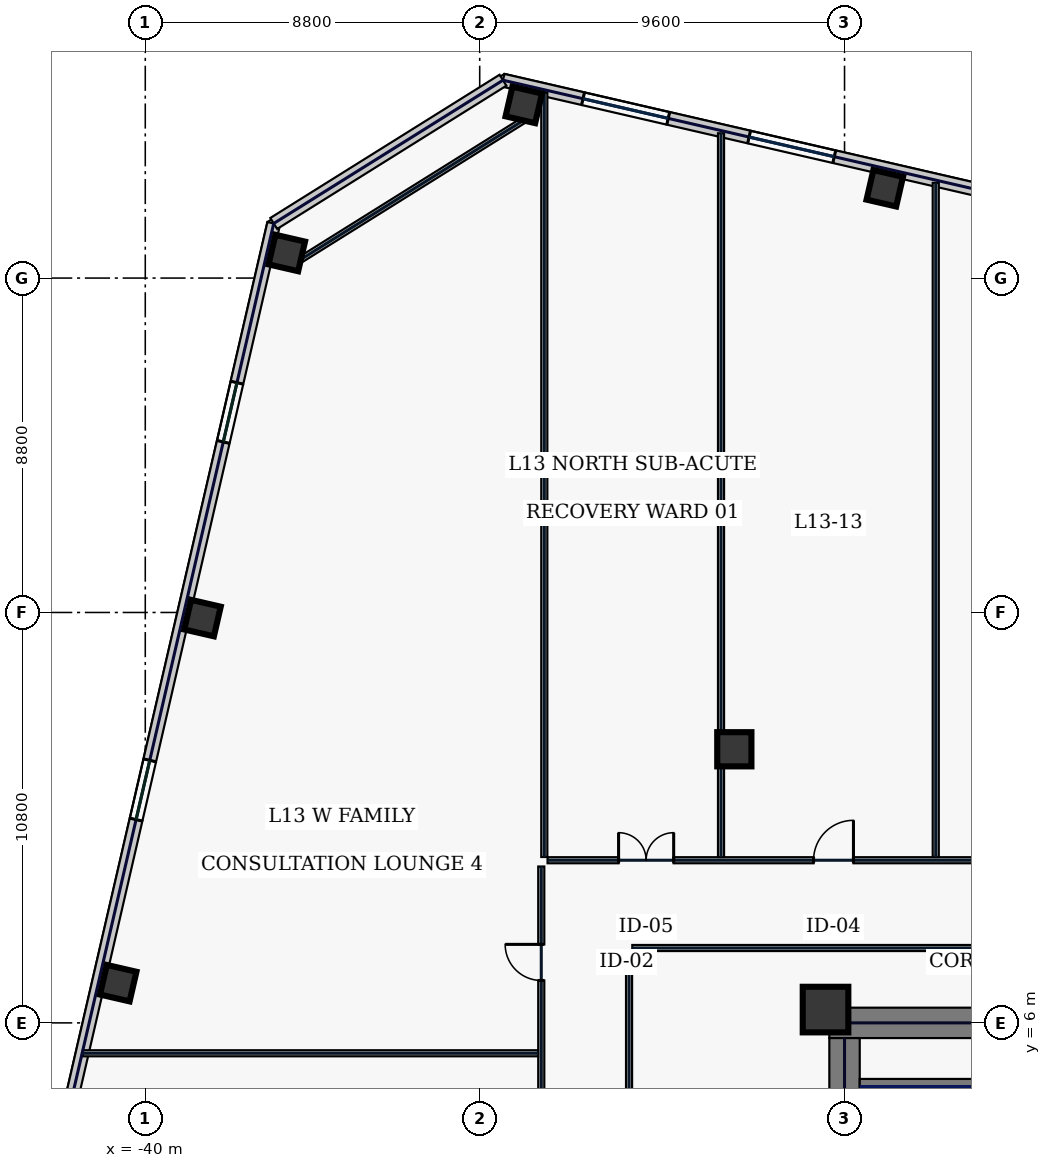
"""IFC4 building model, lengths in metres.
Left out: names, types, materials, properties, quantities, classifications, styles, units other than length and angle.
Written with IfcOpenShell. Run it as: python <this file> out.ifc"""

import sys

from ifc_helpers import new_model, si_unit, direction, frame, frame_2d, origin, origin_2d, place, context, subcontext, project, spatial, rectangle, hollow_rectangle, extrude, element, fill, save


model = new_model("IFC4")
c1 = context("Model", 3, precision=1e-05, world=origin(), true_north=direction((0.0, 1.0)))
c2 = subcontext(c1, "Body", "Model", "MODEL_VIEW")
j1 = project(units=[si_unit("LENGTHUNIT", "METRE"), si_unit("PLANEANGLEUNIT", "RADIAN")], contexts=[c1])
p1 = place(None, origin())
s1 = spatial("IfcSite", under=j1, at=p1, CompositionType="ELEMENT")
p2 = place(p1, origin())
s2 = spatial("IfcBuilding", under=s1, at=p2, CompositionType="ELEMENT")
p3 = place(p2, frame((0.0, 0.0, 63.4)))
s3 = spatial("IfcBuildingStorey", under=s2, at=p3, CompositionType="ELEMENT", Elevation=63.4)
p4 = place(p3, frame((-22.0, 6.0, 0.0), z_axis=(0.0, 0.0, 1.0), x_axis=(1.0, 0.0, 0.0)))
e1 = element("IfcWall", 1, at=p4, inside=s3, PredefinedType="SHEAR", context=c2, shape_type="SweptSolid", body=[
    extrude(rectangle(XDim=11.6, YDim=0.8, at=frame_2d((5.8, 0.0))), origin(), (0.0, 0.0, 1.0), 3.74),
])
p5 = place(p3, frame((-21.6, -5.6, 0.0), z_axis=(0.0, 0.0, 1.0), x_axis=(0.0, 1.0, 0.0)))
e2 = element("IfcWall", 2, at=p5, inside=s3, PredefinedType="SHEAR", context=c2, shape_type="SweptSolid", body=[
    extrude(rectangle(XDim=11.2, YDim=0.8, at=frame_2d((5.6, 0.0))), origin(), (0.0, 0.0, 1.0), 3.74),
])
p6 = place(p3, frame((-21.2, 4.325, 0.0), z_axis=(0.0, 0.0, 1.0), x_axis=(1.0, 0.0, 0.0)))
e3 = element("IfcWall", 3, at=p6, inside=s3, PredefinedType="SHEAR", context=c2, shape_type="SweptSolid", body=[
    extrude(rectangle(XDim=3.4, YDim=0.4, at=frame_2d((1.7, 0.0))), origin(), (0.0, 0.0, 1.0), 3.74),
])
p7 = place(p3, frame((-22.1, 6.35, 0.0), z_axis=(0.0, 0.0, 1.0), x_axis=(1.0, 0.0, 0.0)))
e4 = element("IfcColumn", 4, at=p7, inside=s3, PredefinedType="COLUMN", context=c2, shape_type="SweptSolid", body=[
    extrude(hollow_rectangle(XDim=1.2, YDim=1.2, WallThickness=0.05, at=origin_2d()), origin(), (0.0, 0.0, 1.0), 3.74),
])
p8 = place(p3, frame((-24.5, 13.2, 0.0), z_axis=(0.0, 0.0, 1.0), x_axis=(1.0, 0.0, 0.0)))
e5 = element("IfcColumn", 5, at=p8, inside=s3, PredefinedType="COLUMN", context=c2, shape_type="SweptSolid", body=[
    extrude(hollow_rectangle(XDim=0.9, YDim=0.9, WallThickness=0.04, at=origin_2d()), origin(), (0.0, 0.0, 1.0), 3.74),
])
for number, where, z_axis, x_axis in (
    (6, (-20.541, 27.964, 0.0), (0.0, 0.0, 1.0), (0.974, -0.225, 0.0)),
    (7, (-30.04, 30.156, 0.0), (0.0, 0.0, 1.0), (0.974, -0.225, 0.0)),
    (8, (-36.276, 26.26, 0.0), (0.0, 0.0, 1.0), (0.974, -0.225, 0.0)),
    (9, (-38.494, 16.652, 0.0), (0.0, 0.0, 1.0), (0.974, -0.225, 0.0)),
    (10, (-40.712, 7.045, 0.0), (0.0, 0.0, 1.0), (0.974, -0.225, 0.0)),
):
    element("IfcColumn", number, at=place(p3, frame(where, z_axis=z_axis, x_axis=x_axis)), inside=s3, PredefinedType="COLUMN", context=c2, shape_type="SweptSolid", body=[
        extrude(hollow_rectangle(XDim=0.8, YDim=0.8, WallThickness=0.036, at=origin_2d()), origin(), (0.0, 0.0, 1.0), 3.74),
    ])
p9 = place(p3, frame((-8.517, 25.711, 0.0), z_axis=(0.0, 0.0, 1.0), x_axis=(-0.974372845456, 0.224939009598, 0.0)))
e11 = element("IfcWall", 11, at=p9, inside=s3, PredefinedType="STANDARD", context=c2, shape_type="SweptSolid", body=[
    extrude(rectangle(XDim=22.652, YDim=0.34, at=frame_2d((11.326, 0.0))), origin(), (0.0, 0.0, 1.0), 3.74),
])
p10 = place(p9, frame((18.189, 0.0, 0.77)))
e12 = element("IfcOpeningElement", 12, at=p10, cuts=e11, PredefinedType="OPENING", context=c2, shape_type="SweptSolid", body=[
    extrude(rectangle(XDim=2.3, YDim=2.1, at=frame_2d((1.15, 1.05))), frame((0.0, 0.18, 0.0), z_axis=(0.0, -1.0, 0.0), x_axis=(1.0, 0.0, 0.0)), (0.0, 0.0, 1.0), 0.36),
])
p11 = place(p9, frame((13.705, 0.0, 0.77)))
e13 = element("IfcOpeningElement", 13, at=p11, cuts=e11, PredefinedType="OPENING", context=c2, shape_type="SweptSolid", body=[
    extrude(rectangle(XDim=2.3, YDim=2.1, at=frame_2d((1.15, 1.05))), frame((0.0, 0.18, 0.0), z_axis=(0.0, -1.0, 0.0), x_axis=(1.0, 0.0, 0.0)), (0.0, 0.0, 1.0), 0.36),
])
p12 = place(p9, frame((8.441, 0.0, 0.77)))
e14 = element("IfcOpeningElement", 14, at=p12, cuts=e11, PredefinedType="OPENING", context=c2, shape_type="SweptSolid", body=[
    extrude(rectangle(XDim=0.85, YDim=1.85, at=frame_2d((0.425, 0.925))), frame((0.0, 0.18, 0.0), z_axis=(0.0, -1.0, 0.0), x_axis=(1.0, 0.0, 0.0)), (0.0, 0.0, 1.0), 0.36),
])
p13 = place(p9, frame((3.956, 0.0, 0.77)))
e15 = element("IfcOpeningElement", 15, at=p13, cuts=e11, PredefinedType="OPENING", context=c2, shape_type="SweptSolid", body=[
    extrude(rectangle(XDim=2.3, YDim=2.1, at=frame_2d((1.15, 1.05))), frame((0.0, 0.18, 0.0), z_axis=(0.0, -1.0, 0.0), x_axis=(1.0, 0.0, 0.0)), (0.0, 0.0, 1.0), 0.36),
])
p14 = place(p3, frame((-36.62, 27.037, 0.0), z_axis=(0.0, 0.0, 1.0), x_axis=(-0.224951280646, -0.974370012539, 0.0)))
e16 = element("IfcWall", 16, at=p14, inside=s3, PredefinedType="STANDARD", context=c2, shape_type="SweptSolid", body=[
    extrude(rectangle(XDim=40.8, YDim=0.34, at=frame_2d((20.4, 0.0))), origin(), (0.0, 0.0, 1.0), 3.74),
])
p15 = place(p14, frame((4.3, 0.0, 0.58)))
e17 = element("IfcOpeningElement", 17, at=p15, cuts=e16, PredefinedType="OPENING", context=c2, shape_type="SweptSolid", body=[
    extrude(rectangle(XDim=1.6, YDim=2.3, at=frame_2d((0.8, 1.15))), frame((0.0, 0.18, 0.0), z_axis=(0.0, -1.0, 0.0), x_axis=(1.0, 0.0, 0.0)), (0.0, 0.0, 1.0), 0.36),
])
p16 = place(p14, frame((14.5, 0.0, 0.58)))
e18 = element("IfcOpeningElement", 18, at=p16, cuts=e16, PredefinedType="OPENING", context=c2, shape_type="SweptSolid", body=[
    extrude(rectangle(XDim=1.6, YDim=2.3, at=frame_2d((0.8, 1.15))), frame((0.0, 0.18, 0.0), z_axis=(0.0, -1.0, 0.0), x_axis=(1.0, 0.0, 0.0)), (0.0, 0.0, 1.0), 0.36),
])
p17 = place(p14, frame((24.7, 0.0, 0.58)))
e19 = element("IfcOpeningElement", 19, at=p17, cuts=e16, PredefinedType="OPENING", context=c2, shape_type="SweptSolid", body=[
    extrude(rectangle(XDim=1.6, YDim=2.3, at=frame_2d((0.8, 1.15))), frame((0.0, 0.18, 0.0), z_axis=(0.0, -1.0, 0.0), x_axis=(1.0, 0.0, 0.0)), (0.0, 0.0, 1.0), 0.36),
])
p18 = place(p14, frame((34.9, 0.0, 0.58)))
e20 = element("IfcOpeningElement", 20, at=p18, cuts=e16, PredefinedType="OPENING", context=c2, shape_type="SweptSolid", body=[
    extrude(rectangle(XDim=1.6, YDim=2.3, at=frame_2d((0.8, 1.15))), frame((0.0, 0.18, 0.0), z_axis=(0.0, -1.0, 0.0), x_axis=(1.0, 0.0, 0.0)), (0.0, 0.0, 1.0), 0.36),
])
p19 = place(p3, frame((-30.588, 30.807, 0.0), z_axis=(0.0, 0.0, 1.0), x_axis=(-0.848031080615, -0.529946493819, 0.0)))
e21 = element("IfcWall", 21, at=p19, inside=s3, PredefinedType="STANDARD", context=c2, shape_type="SweptSolid", body=[
    extrude(rectangle(XDim=7.114, YDim=0.34, at=frame_2d((3.557, 0.0))), origin(), (0.0, 0.0, 1.0), 3.74),
])
p20 = place(p3, frame((-29.86, 29.868, 0.0), z_axis=(0.0, 0.0, 1.0), x_axis=(-0.848043064089, -0.529927317139, 0.0)))
e22 = element("IfcWall", 22, at=p20, inside=s3, PredefinedType="PARTITIONING", context=c2, shape_type="SweptSolid", body=[
    extrude(rectangle(XDim=7.354, YDim=0.16, at=frame_2d((3.677, 0.0))), origin(), (0.0, 0.0, 1.0), 3.74),
])
p21 = place(p3, frame((-29.58, -10.015, 0.0), z_axis=(0.0, 0.0, 1.0), x_axis=(0.0, 1.0, 0.0)))
e23 = element("IfcWall", 23, at=p21, inside=s3, PredefinedType="PARTITIONING", context=c2, shape_type="SweptSolid", body=[
    extrude(rectangle(XDim=20.13, YDim=0.16, at=frame_2d((10.065, 0.0))), origin(), (0.0, 0.0, 1.0), 3.74),
])
p22 = place(p21, frame((2.169, 0.0, 0.0)))
e24 = element("IfcOpeningElement", 24, at=p22, cuts=e23, PredefinedType="OPENING", context=c2, shape_type="SweptSolid", body=[
    extrude(rectangle(XDim=0.95, YDim=2.2, at=frame_2d((0.475, 1.1))), frame((0.0, 0.09, 0.0), z_axis=(0.0, -1.0, 0.0), x_axis=(1.0, 0.0, 0.0)), (0.0, 0.0, 1.0), 0.18),
])
p23 = place(p21, frame((7.025, 0.0, 0.0)))
e25 = element("IfcOpeningElement", 25, at=p23, cuts=e23, PredefinedType="OPENING", context=c2, shape_type="SweptSolid", body=[
    extrude(rectangle(XDim=0.95, YDim=2.2, at=frame_2d((0.475, 1.1))), frame((0.0, 0.09, 0.0), z_axis=(0.0, -1.0, 0.0), x_axis=(1.0, 0.0, 0.0)), (0.0, 0.0, 1.0), 0.18),
])
p24 = place(p21, frame((12.225, 0.0, 0.0)))
e26 = element("IfcOpeningElement", 26, at=p24, cuts=e23, PredefinedType="OPENING", context=c2, shape_type="SweptSolid", body=[
    extrude(rectangle(XDim=0.95, YDim=2.2, at=frame_2d((0.475, 1.1))), frame((0.0, 0.09, 0.0), z_axis=(0.0, -1.0, 0.0), x_axis=(1.0, 0.0, 0.0)), (0.0, 0.0, 1.0), 0.18),
])
p25 = place(p21, frame((17.131, 0.0, 0.0)))
e27 = element("IfcOpeningElement", 27, at=p25, cuts=e23, PredefinedType="OPENING", context=c2, shape_type="SweptSolid", body=[
    extrude(rectangle(XDim=0.95, YDim=2.2, at=frame_2d((0.475, 1.1))), frame((0.0, 0.09, 0.0), z_axis=(0.0, -1.0, 0.0), x_axis=(1.0, 0.0, 0.0)), (0.0, 0.0, 1.0), 0.18),
])
p26 = place(p3, frame((-29.415, 10.28, 0.0), z_axis=(0.0, 0.0, 1.0), x_axis=(1.0, 0.0, 0.0)))
e28 = element("IfcWall", 28, at=p26, inside=s3, PredefinedType="PARTITIONING", context=c2, shape_type="SweptSolid", body=[
    extrude(rectangle(XDim=58.83, YDim=0.16, at=frame_2d((29.415, 0.0))), origin(), (0.0, 0.0, 1.0), 3.74),
])
p27 = place(p26, frame((1.869, 0.0, 0.0)))
e29 = element("IfcOpeningElement", 29, at=p27, cuts=e28, PredefinedType="OPENING", context=c2, shape_type="SweptSolid", body=[
    extrude(rectangle(XDim=1.45, YDim=2.2, at=frame_2d((0.725, 1.1))), frame((0.0, 0.09, 0.0), z_axis=(0.0, -1.0, 0.0), x_axis=(1.0, 0.0, 0.0)), (0.0, 0.0, 1.0), 0.18),
])
p28 = place(p26, frame((7.0, 0.0, 0.0)))
e30 = element("IfcOpeningElement", 30, at=p28, cuts=e28, PredefinedType="OPENING", context=c2, shape_type="SweptSolid", body=[
    extrude(rectangle(XDim=1.05, YDim=2.2, at=frame_2d((0.525, 1.1))), frame((0.0, 0.09, 0.0), z_axis=(0.0, -1.0, 0.0), x_axis=(1.0, 0.0, 0.0)), (0.0, 0.0, 1.0), 0.18),
])
p29 = place(p26, frame((13.95, 0.0, 0.0)))
e31 = element("IfcOpeningElement", 31, at=p29, cuts=e28, PredefinedType="OPENING", context=c2, shape_type="SweptSolid", body=[
    extrude(rectangle(XDim=1.3, YDim=2.2, at=frame_2d((0.65, 1.1))), frame((0.0, 0.09, 0.0), z_axis=(0.0, -1.0, 0.0), x_axis=(1.0, 0.0, 0.0)), (0.0, 0.0, 1.0), 0.18),
])
p30 = place(p26, frame((23.125, 0.0, 0.0)))
e32 = element("IfcOpeningElement", 32, at=p30, cuts=e28, PredefinedType="OPENING", context=c2, shape_type="SweptSolid", body=[
    extrude(rectangle(XDim=0.95, YDim=2.2, at=frame_2d((0.475, 1.1))), frame((0.0, 0.09, 0.0), z_axis=(0.0, -1.0, 0.0), x_axis=(1.0, 0.0, 0.0)), (0.0, 0.0, 1.0), 0.18),
])
p31 = place(p26, frame((32.875, 0.0, 0.0)))
e33 = element("IfcOpeningElement", 33, at=p31, cuts=e28, PredefinedType="OPENING", context=c2, shape_type="SweptSolid", body=[
    extrude(rectangle(XDim=1.15, YDim=2.2, at=frame_2d((0.575, 1.1))), frame((0.0, 0.09, 0.0), z_axis=(0.0, -1.0, 0.0), x_axis=(1.0, 0.0, 0.0)), (0.0, 0.0, 1.0), 0.18),
])
p32 = place(p26, frame((43.039, 0.0, 0.0)))
e34 = element("IfcOpeningElement", 34, at=p32, cuts=e28, PredefinedType="OPENING", context=c2, shape_type="SweptSolid", body=[
    extrude(rectangle(XDim=0.95, YDim=2.2, at=frame_2d((0.475, 1.1))), frame((0.0, 0.09, 0.0), z_axis=(0.0, -1.0, 0.0), x_axis=(1.0, 0.0, 0.0)), (0.0, 0.0, 1.0), 0.18),
])
p33 = place(p26, frame((51.559, 0.0, 0.0)))
e35 = element("IfcOpeningElement", 35, at=p33, cuts=e28, PredefinedType="OPENING", context=c2, shape_type="SweptSolid", body=[
    extrude(rectangle(XDim=1.45, YDim=2.2, at=frame_2d((0.725, 1.1))), frame((0.0, 0.09, 0.0), z_axis=(0.0, -1.0, 0.0), x_axis=(1.0, 0.0, 0.0)), (0.0, 0.0, 1.0), 0.18),
])
p34 = place(p26, frame((56.006, 0.0, 0.0)))
e36 = element("IfcOpeningElement", 36, at=p34, cuts=e28, PredefinedType="OPENING", context=c2, shape_type="SweptSolid", body=[
    extrude(rectangle(XDim=0.95, YDim=2.2, at=frame_2d((0.475, 1.1))), frame((0.0, 0.09, 0.0), z_axis=(0.0, -1.0, 0.0), x_axis=(1.0, 0.0, 0.0)), (0.0, 0.0, 1.0), 0.18),
])
p35 = place(p3, frame((-10.665, 7.97, 0.0), z_axis=(0.0, 0.0, 1.0), x_axis=(-1.0, 0.0, 0.0)))
e37 = element("IfcWall", 37, at=p35, inside=s3, PredefinedType="PARTITIONING", context=c2, shape_type="SweptSolid", body=[
    extrude(rectangle(XDim=16.52, YDim=0.16, at=frame_2d((8.26, 0.0))), origin(), (0.0, 0.0, 1.0), 3.74),
])
p36 = place(p3, frame((-27.27, 7.885, 0.0), z_axis=(0.0, 0.0, 1.0), x_axis=(0.0, -1.0, 0.0)))
e38 = element("IfcWall", 38, at=p36, inside=s3, PredefinedType="PARTITIONING", context=c2, shape_type="SweptSolid", body=[
    extrude(rectangle(XDim=15.67, YDim=0.16, at=frame_2d((7.835, 0.0))), origin(), (0.0, 0.0, 1.0), 3.74),
])
p37 = place(p3, frame((-29.5, 10.365, 0.0), z_axis=(0.0, 0.0, 1.0), x_axis=(0.0, 1.0, 0.0)))
e39 = element("IfcWall", 39, at=p37, inside=s3, PredefinedType="PARTITIONING", context=c2, shape_type="SweptSolid", body=[
    extrude(rectangle(XDim=20.119, YDim=0.16, at=frame_2d((10.059, 0.0))), origin(), (0.0, 0.0, 1.0), 3.74),
])
p38 = place(p3, frame((-24.85, 10.365, 0.0), z_axis=(0.0, 0.0, 1.0), x_axis=(0.0, 1.0, 0.0)))
e40 = element("IfcWall", 40, at=p38, inside=s3, PredefinedType="PARTITIONING", context=c2, shape_type="SweptSolid", body=[
    extrude(rectangle(XDim=19.045, YDim=0.16, at=frame_2d((9.522, 0.0))), origin(), (0.0, 0.0, 1.0), 3.74),
])
p39 = place(p3, frame((-19.2, 10.365, 0.0), z_axis=(0.0, 0.0, 1.0), x_axis=(0.0, 1.0, 0.0)))
e41 = element("IfcWall", 41, at=p39, inside=s3, PredefinedType="PARTITIONING", context=c2, shape_type="SweptSolid", body=[
    extrude(rectangle(XDim=17.741, YDim=0.16, at=frame_2d((8.87, 0.0))), origin(), (0.0, 0.0, 1.0), 3.74),
])
p40 = place(p3, frame((-41.641, 5.2, 0.0), z_axis=(0.0, 0.0, 1.0), x_axis=(1.0, 0.0, 0.0)))
e42 = element("IfcWall", 42, at=p40, inside=s3, PredefinedType="PARTITIONING", context=c2, shape_type="SweptSolid", body=[
    extrude(rectangle(XDim=11.976, YDim=0.16, at=frame_2d((5.988, 0.0))), origin(), (0.0, 0.0, 1.0), 3.74),
])
p41 = place(p10, origin())
e43 = element("IfcWindow", 43, at=p41, inside=s3, PartitioningType="SINGLE_PANEL", PredefinedType="WINDOW", context=c2, shape_type="SweptSolid", body=[
    extrude(rectangle(XDim=2.3, YDim=2.1, at=frame_2d((1.15, 1.05))), frame((0.0, 0.03, 0.0), z_axis=(0.0, -1.0, 0.0), x_axis=(1.0, 0.0, 0.0)), (0.0, 0.0, 1.0), 0.06),
])
fill(e12, e43)
p42 = place(p11, origin())
e44 = element("IfcWindow", 44, at=p42, inside=s3, PartitioningType="SINGLE_PANEL", PredefinedType="WINDOW", context=c2, shape_type="SweptSolid", body=[
    extrude(rectangle(XDim=2.3, YDim=2.1, at=frame_2d((1.15, 1.05))), frame((0.0, 0.03, 0.0), z_axis=(0.0, -1.0, 0.0), x_axis=(1.0, 0.0, 0.0)), (0.0, 0.0, 1.0), 0.06),
])
fill(e13, e44)
p43 = place(p15, origin())
e45 = element("IfcWindow", 45, at=p43, inside=s3, PartitioningType="SINGLE_PANEL", PredefinedType="WINDOW", context=c2, shape_type="SweptSolid", body=[
    extrude(rectangle(XDim=1.6, YDim=2.3, at=frame_2d((0.8, 1.15))), frame((0.0, 0.03, 0.0), z_axis=(0.0, -1.0, 0.0), x_axis=(1.0, 0.0, 0.0)), (0.0, 0.0, 1.0), 0.06),
])
fill(e17, e45)
p44 = place(p16, origin())
e46 = element("IfcWindow", 46, at=p44, inside=s3, PartitioningType="SINGLE_PANEL", PredefinedType="WINDOW", context=c2, shape_type="SweptSolid", body=[
    extrude(rectangle(XDim=1.6, YDim=2.3, at=frame_2d((0.8, 1.15))), frame((0.0, 0.03, 0.0), z_axis=(0.0, -1.0, 0.0), x_axis=(1.0, 0.0, 0.0)), (0.0, 0.0, 1.0), 0.06),
])
fill(e18, e46)
p45 = place(p27, origin())
e47 = element("IfcDoor", 47, at=p45, inside=s3, OperationType="DOUBLE_SWING_LEFT", PredefinedType="DOOR", context=c2, shape_type="SweptSolid", body=[
    extrude(rectangle(XDim=1.45, YDim=2.2, at=frame_2d((0.725, 1.1))), frame((0.0, 0.025, 0.0), z_axis=(0.0, -1.0, 0.0), x_axis=(1.0, 0.0, 0.0)), (0.0, 0.0, 1.0), 0.05),
])
fill(e29, e47)
p46 = place(p28, origin())
e48 = element("IfcDoor", 48, at=p46, inside=s3, OperationType="SINGLE_SWING_RIGHT", PredefinedType="DOOR", context=c2, shape_type="SweptSolid", body=[
    extrude(rectangle(XDim=1.05, YDim=2.2, at=frame_2d((0.525, 1.1))), frame((0.0, 0.025, 0.0), z_axis=(0.0, -1.0, 0.0), x_axis=(1.0, 0.0, 0.0)), (0.0, 0.0, 1.0), 0.05),
])
fill(e30, e48)
p47 = place(p25, origin())
e49 = element("IfcDoor", 49, at=p47, inside=s3, OperationType="SINGLE_SWING_RIGHT", PredefinedType="DOOR", context=c2, shape_type="SweptSolid", body=[
    extrude(rectangle(XDim=0.95, YDim=2.2, at=frame_2d((0.475, 1.1))), frame((0.0, 0.025, 0.0), z_axis=(0.0, -1.0, 0.0), x_axis=(1.0, 0.0, 0.0)), (0.0, 0.0, 1.0), 0.05),
])
fill(e27, e49)
save(model, sys.argv[1])
